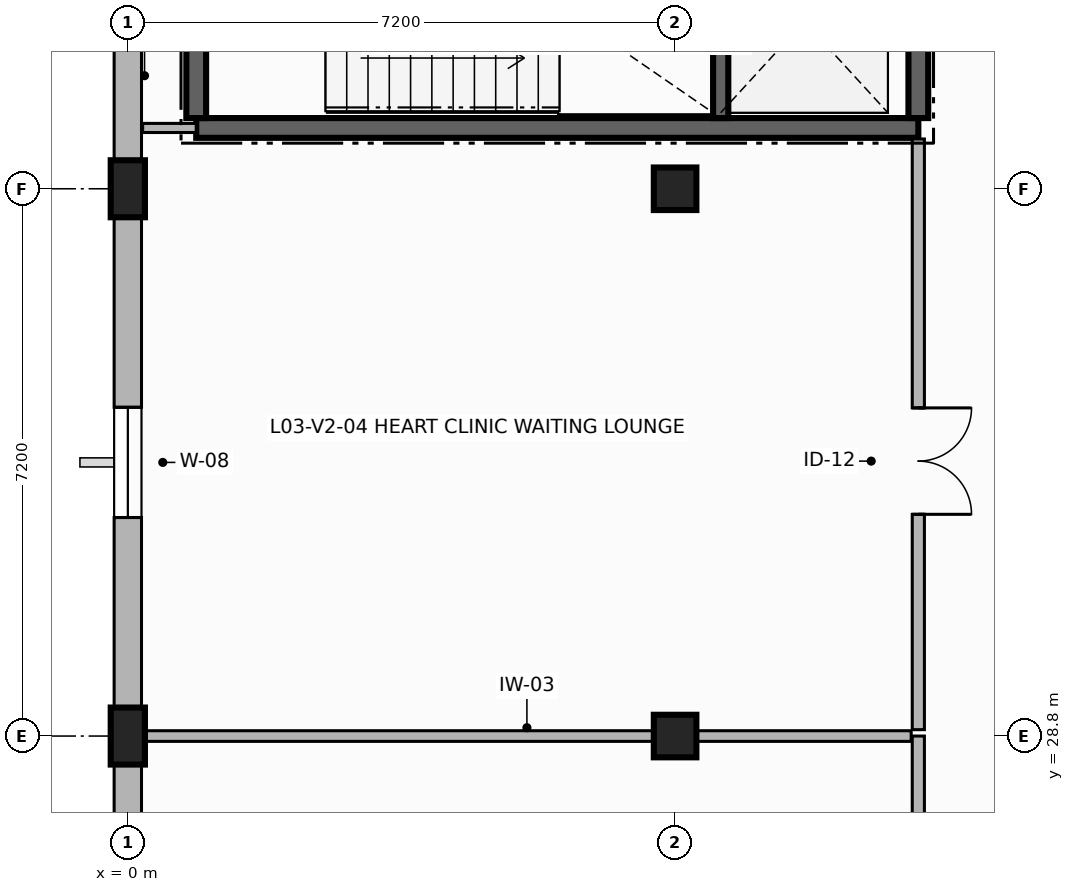
"""IFC4 building model, lengths in metres.
Left out: names, types, materials, properties, quantities, classifications, styles, units other than length and angle.
Written with IfcOpenShell. Run it as: python <this file> out.ifc"""

import sys

from ifc_helpers import new_model, si_unit, direction, frame, frame_2d, origin, origin_2d, place, context, subcontext, project, spatial, rectangle, extrude, element, fill, save


model = new_model("IFC4")
c1 = context("Model", 3, precision=1e-05, world=origin(), true_north=direction((0.0, 1.0)))
c2 = subcontext(c1, "Body", "Model", "MODEL_VIEW")
j1 = project(units=[si_unit("LENGTHUNIT", "METRE"), si_unit("PLANEANGLEUNIT", "RADIAN")], contexts=[c1])
p1 = place(None, origin())
s1 = spatial("IfcSite", under=j1, at=p1, CompositionType="ELEMENT")
p2 = place(p1, origin())
s2 = spatial("IfcBuilding", under=s1, at=p2, CompositionType="ELEMENT")
p3 = place(p2, frame((0.0, 0.0, 12.3)))
s3 = spatial("IfcBuildingStorey", under=s2, at=p3, CompositionType="ELEMENT", Elevation=12.3)
for number, where, z_axis, x_axis in (
    (1, (0.0, 28.8, 0.0), (0.0, 0.0, 1.0), (1.0, 0.0, 0.0)),
    (2, (0.0, 36.0, 0.0), (0.0, 0.0, 1.0), (1.0, 0.0, 0.0)),
):
    element("IfcColumn", number, at=place(p3, frame(where, z_axis=z_axis, x_axis=x_axis)), inside=s3, PredefinedType="PILASTER", context=c2, shape_type="SweptSolid", body=[
        extrude(rectangle(XDim=0.45, YDim=0.75, at=origin_2d()), origin(), (0.0, 0.0, 1.0), 3.42),
    ])
for number, where, z_axis, x_axis in (
    (3, (7.2, 28.8, 0.0), (0.0, 0.0, 1.0), (1.0, 0.0, 0.0)),
    (4, (7.2, 36.0, 0.0), (0.0, 0.0, 1.0), (1.0, 0.0, 0.0)),
):
    element("IfcColumn", number, at=place(p3, frame(where, z_axis=z_axis, x_axis=x_axis)), inside=s3, PredefinedType="COLUMN", context=c2, shape_type="SweptSolid", body=[
        extrude(rectangle(XDim=0.56, YDim=0.56, at=origin_2d()), origin(), (0.0, 0.0, 1.0), 3.42),
    ])
p4 = place(p3, frame((0.0, 43.2, 0.0), z_axis=(0.0, 0.0, 1.0), x_axis=(0.0, -1.0, 0.0)))
e5 = element("IfcWall", 5, at=p4, inside=s3, PredefinedType="SOLIDWALL", context=c2, shape_type="SweptSolid", body=[
    extrude(rectangle(XDim=7.2, YDim=0.36, at=frame_2d((3.6, 0.0))), origin(), (0.0, 0.0, 1.0), 2.8),
])
p5 = place(p4, frame((2.775, 0.0, 0.85)))
e6 = element("IfcOpeningElement", 6, at=p5, cuts=e5, PredefinedType="OPENING", context=c2, shape_type="SweptSolid", body=[
    extrude(rectangle(XDim=1.45, YDim=1.75, at=frame_2d((0.725, 0.875))), frame((0.0, 0.19, 0.0), z_axis=(0.0, -1.0, 0.0), x_axis=(1.0, 0.0, 0.0)), (0.0, 0.0, 1.0), 0.38),
])
p6 = place(p3, frame((0.0, 36.0, 0.0), z_axis=(0.0, 0.0, 1.0), x_axis=(0.0, -1.0, 0.0)))
e7 = element("IfcWall", 7, at=p6, inside=s3, PredefinedType="SOLIDWALL", context=c2, shape_type="SweptSolid", body=[
    extrude(rectangle(XDim=7.2, YDim=0.36, at=frame_2d((3.6, 0.0))), origin(), (0.0, 0.0, 1.0), 2.8),
])
p7 = place(p6, frame((2.875, 0.0, 0.85)))
e8 = element("IfcOpeningElement", 8, at=p7, cuts=e7, PredefinedType="OPENING", context=c2, shape_type="SweptSolid", body=[
    extrude(rectangle(XDim=1.45, YDim=1.75, at=frame_2d((0.725, 0.875))), frame((0.0, 0.19, 0.0), z_axis=(0.0, -1.0, 0.0), x_axis=(1.0, 0.0, 0.0)), (0.0, 0.0, 1.0), 0.38),
])
p8 = place(p3, frame((0.0, 28.8, 0.0), z_axis=(0.0, 0.0, 1.0), x_axis=(0.0, -1.0, 0.0)))
e9 = element("IfcWall", 9, at=p8, inside=s3, PredefinedType="SOLIDWALL", context=c2, shape_type="SweptSolid", body=[
    extrude(rectangle(XDim=7.2, YDim=0.36, at=frame_2d((3.6, 0.0))), origin(), (0.0, 0.0, 1.0), 2.8),
])
p9 = place(p8, frame((2.875, 0.0, 0.85)))
e10 = element("IfcOpeningElement", 10, at=p9, cuts=e9, PredefinedType="OPENING", context=c2, shape_type="SweptSolid", body=[
    extrude(rectangle(XDim=1.45, YDim=1.75, at=frame_2d((0.725, 0.875))), frame((0.0, 0.19, 0.0), z_axis=(0.0, -1.0, 0.0), x_axis=(1.0, 0.0, 0.0)), (0.0, 0.0, 1.0), 0.38),
])
p10 = place(p3, frame((0.9, 36.8, 0.0), z_axis=(0.0, 0.0, 1.0), x_axis=(1.0, 0.0, 0.0)))
e11 = element("IfcWall", 11, at=p10, inside=s3, PredefinedType="SHEAR", context=c2, shape_type="SweptSolid", body=[
    extrude(rectangle(XDim=9.5, YDim=0.26, at=frame_2d((4.75, 0.0))), origin(), (0.0, 0.0, 1.0), 3.42),
])
p11 = place(p3, frame((10.4, 36.93, 0.0), z_axis=(0.0, 0.0, 1.0), x_axis=(0.0, 1.0, 0.0)))
e12 = element("IfcWall", 12, at=p11, inside=s3, PredefinedType="SHEAR", context=c2, shape_type="SweptSolid", body=[
    extrude(rectangle(XDim=5.54, YDim=0.26, at=frame_2d((2.77, 0.0))), origin(), (0.0, 0.0, 1.0), 3.42),
])
p12 = place(p11, frame((4.07, 0.0, 0.0)))
e13 = element("IfcOpeningElement", 13, at=p12, cuts=e12, PredefinedType="OPENING", context=c2, shape_type="SweptSolid", body=[
    extrude(rectangle(XDim=1.15, YDim=2.2, at=frame_2d((0.575, 1.1))), frame((0.0, 0.14, 0.0), z_axis=(0.0, -1.0, 0.0), x_axis=(1.0, 0.0, 0.0)), (0.0, 0.0, 1.0), 0.28),
])
p13 = place(p3, frame((0.9, 42.47, 0.0), z_axis=(0.0, 0.0, 1.0), x_axis=(0.0, -1.0, 0.0)))
e14 = element("IfcWall", 14, at=p13, inside=s3, PredefinedType="SHEAR", context=c2, shape_type="SweptSolid", body=[
    extrude(rectangle(XDim=5.54, YDim=0.26, at=frame_2d((2.77, 0.0))), origin(), (0.0, 0.0, 1.0), 3.42),
])
p14 = place(p3, frame((7.8, 36.93, 0.0), z_axis=(0.0, 0.0, 1.0), x_axis=(0.0, 1.0, 0.0)))
e15 = element("IfcWall", 15, at=p14, inside=s3, PredefinedType="SHEAR", context=c2, shape_type="SweptSolid", body=[
    extrude(rectangle(XDim=3.67, YDim=0.2, at=frame_2d((1.835, 0.0))), origin(), (0.0, 0.0, 1.0), 3.42),
])
p15 = place(p3, frame((10.4, 28.8, 0.0), z_axis=(0.0, 0.0, 1.0), x_axis=(0.0, -1.0, 0.0)))
e16 = element("IfcWall", 16, at=p15, inside=s3, PredefinedType="PARTITIONING", context=c2, shape_type="SweptSolid", body=[
    extrude(rectangle(XDim=7.116, YDim=0.16, at=frame_2d((3.558, 0.0))), origin(), (0.0, 0.0, 1.0), 2.78),
])
p16 = place(p15, frame((3.058, 0.0, 0.0)))
e17 = element("IfcOpeningElement", 17, at=p16, cuts=e16, PredefinedType="OPENING", context=c2, shape_type="SweptSolid", body=[
    extrude(rectangle(XDim=1.0, YDim=2.15, at=frame_2d((0.5, 1.075))), frame((0.0, 0.09, 0.0), z_axis=(0.0, -1.0, 0.0), x_axis=(1.0, 0.0, 0.0)), (0.0, 0.0, 1.0), 0.18),
])
p17 = place(p3, frame((0.195, 28.8, 0.0), z_axis=(0.0, 0.0, 1.0), x_axis=(1.0, 0.0, 0.0)))
e18 = element("IfcWall", 18, at=p17, inside=s3, PredefinedType="PARTITIONING", context=c2, shape_type="SweptSolid", body=[
    extrude(rectangle(XDim=10.111, YDim=0.14, at=frame_2d((5.055, 0.0))), origin(), (0.0, 0.0, 1.0), 2.78),
])
p18 = place(p3, frame((10.4, 36.655, 0.0), z_axis=(0.0, 0.0, 1.0), x_axis=(0.0, -1.0, 0.0)))
e19 = element("IfcWall", 19, at=p18, inside=s3, PredefinedType="PARTITIONING", context=c2, shape_type="SweptSolid", body=[
    extrude(rectangle(XDim=7.771, YDim=0.16, at=frame_2d((3.885, 0.0))), origin(), (0.0, 0.0, 1.0), 2.78),
])
p19 = place(p18, frame((3.538, 0.0, 0.0)))
e20 = element("IfcOpeningElement", 20, at=p19, cuts=e19, PredefinedType="OPENING", context=c2, shape_type="SweptSolid", body=[
    extrude(rectangle(XDim=1.4, YDim=2.3, at=frame_2d((0.7, 1.15))), frame((0.0, 0.09, 0.0), z_axis=(0.0, -1.0, 0.0), x_axis=(1.0, 0.0, 0.0)), (0.0, 0.0, 1.0), 0.18),
])
p20 = place(p3, frame((0.195, 36.8, 0.0), z_axis=(0.0, 0.0, 1.0), x_axis=(1.0, 0.0, 0.0)))
e21 = element("IfcWall", 21, at=p20, inside=s3, PredefinedType="PARTITIONING", context=c2, shape_type="SweptSolid", body=[
    extrude(rectangle(XDim=0.705, YDim=0.12, at=frame_2d((0.353, 0.0))), origin(), (0.0, 0.0, 1.0), 2.78),
])
p21 = place(p7, origin())
e22 = element("IfcWindow", 22, at=p21, inside=s3, PartitioningType="SINGLE_PANEL", PredefinedType="WINDOW", context=c2, shape_type="SweptSolid", body=[
    extrude(rectangle(XDim=1.45, YDim=1.75, at=frame_2d((0.725, 0.875))), frame((0.0, 0.03, 0.0), z_axis=(0.0, -1.0, 0.0), x_axis=(1.0, 0.0, 0.0)), (0.0, 0.0, 1.0), 0.06),
])
fill(e8, e22)
p22 = place(p19, origin())
e23 = element("IfcDoor", 23, at=p22, inside=s3, OperationType="DOUBLE_DOOR_SINGLE_SWING", PredefinedType="DOOR", context=c2, shape_type="SweptSolid", body=[
    extrude(rectangle(XDim=1.4, YDim=2.3, at=frame_2d((0.7, 1.15))), frame((0.0, 0.025, 0.0), z_axis=(0.0, -1.0, 0.0), x_axis=(1.0, 0.0, 0.0)), (0.0, 0.0, 1.0), 0.05),
])
fill(e20, e23)
save(model, sys.argv[1])
